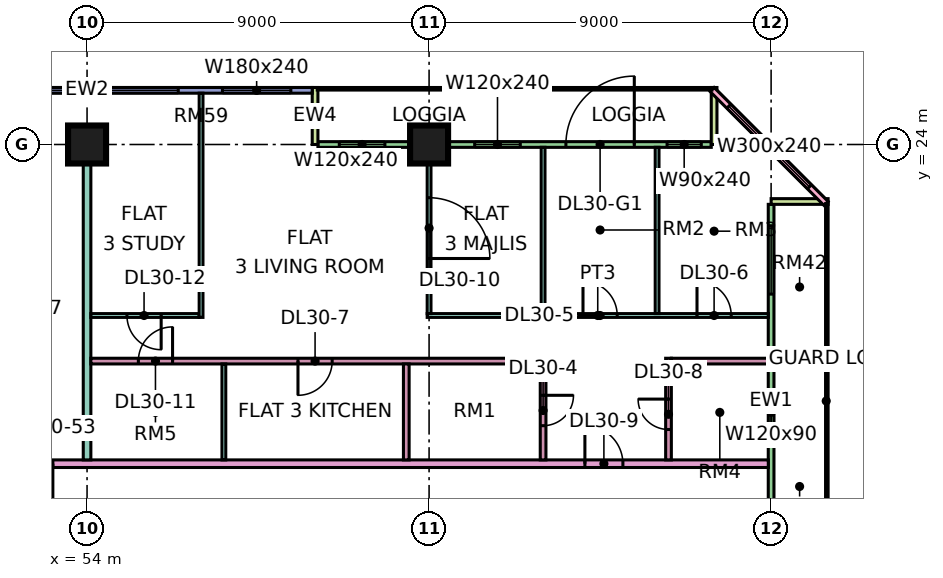
"""IFC4 building model, lengths in metres.
Left out: names, types, materials, properties, quantities, classifications, styles, units other than length and angle.
Written with IfcOpenShell. Run it as: python <this file> out.ifc"""

import sys

from ifc_helpers import new_model, si_unit, direction, frame, frame_2d, origin, origin_2d, place, context, subcontext, project, spatial, rectangle, extrude, element, fill, save


model = new_model("IFC4")
c1 = context("Model", 3, precision=1e-05, world=origin(), true_north=direction((0.0, 1.0)))
c2 = subcontext(c1, "Body", "Model", "MODEL_VIEW")
j1 = project(units=[si_unit("LENGTHUNIT", "METRE"), si_unit("PLANEANGLEUNIT", "RADIAN")], contexts=[c1])
p1 = place(None, origin())
s1 = spatial("IfcSite", under=j1, at=p1, CompositionType="ELEMENT")
p2 = place(p1, origin())
s2 = spatial("IfcBuilding", under=s1, at=p2, CompositionType="ELEMENT")
p3 = place(p2, frame((0.0, 0.0, 129.4)))
s3 = spatial("IfcBuildingStorey", under=s2, at=p3, CompositionType="ELEMENT", Elevation=129.4)
for number, where, z_axis, x_axis in (
    (1, (54.0, 24.0, 0.0), (0.0, 0.0, 1.0), (1.0, 0.0, 0.0)),
    (2, (63.0, 24.0, 0.0), (0.0, 0.0, 1.0), (1.0, 0.0, 0.0)),
):
    element("IfcColumn", number, at=place(p3, frame(where, z_axis=z_axis, x_axis=x_axis)), inside=s3, PredefinedType="COLUMN", context=c2, shape_type="SweptSolid", body=[
        extrude(rectangle(XDim=1.0, YDim=1.0, at=origin_2d()), origin(), (0.0, 0.0, 1.0), 3.75),
    ])
p4 = place(p3, frame((70.425, 24.0, 0.0), z_axis=(0.0, 0.0, 1.0), x_axis=(-1.0, 0.0, 0.0)))
e3 = element("IfcWall", 3, at=p4, inside=s3, PredefinedType="SOLIDWALL", context=c2, shape_type="SweptSolid", body=[
    extrude(rectangle(XDim=10.35, YDim=0.15, at=frame_2d((5.175, 0.0))), origin(), (0.0, 0.0, 1.0), 3.35),
])
p5 = place(p4, frame((0.262, 0.0, 0.45)))
e4 = element("IfcOpeningElement", 4, at=p5, cuts=e3, PredefinedType="OPENING", context=c2, shape_type="SweptSolid", body=[
    extrude(rectangle(XDim=0.9, YDim=2.4, at=frame_2d((0.45, 1.2))), frame((0.0, 0.085, 0.0), z_axis=(0.0, -1.0, 0.0), x_axis=(1.0, 0.0, 0.0)), (0.0, 0.0, 1.0), 0.17),
])
p6 = place(p4, frame((2.025, 0.0, 0.0)))
e5 = element("IfcOpeningElement", 5, at=p6, cuts=e3, PredefinedType="OPENING", context=c2, shape_type="SweptSolid", body=[
    extrude(rectangle(XDim=1.8, YDim=2.4, at=frame_2d((0.9, 1.2))), frame((0.0, 0.085, 0.0), z_axis=(0.0, -1.0, 0.0), x_axis=(1.0, 0.0, 0.0)), (0.0, 0.0, 1.0), 0.17),
])
p7 = place(p4, frame((5.025, 0.0, 0.45)))
e6 = element("IfcOpeningElement", 6, at=p7, cuts=e3, PredefinedType="OPENING", context=c2, shape_type="SweptSolid", body=[
    extrude(rectangle(XDim=1.2, YDim=2.4, at=frame_2d((0.6, 1.2))), frame((0.0, 0.085, 0.0), z_axis=(0.0, -1.0, 0.0), x_axis=(1.0, 0.0, 0.0)), (0.0, 0.0, 1.0), 0.17),
])
p8 = place(p4, frame((8.587, 0.0, 0.45)))
e7 = element("IfcOpeningElement", 7, at=p8, cuts=e3, PredefinedType="OPENING", context=c2, shape_type="SweptSolid", body=[
    extrude(rectangle(XDim=1.2, YDim=2.4, at=frame_2d((0.6, 1.2))), frame((0.0, 0.085, 0.0), z_axis=(0.0, -1.0, 0.0), x_axis=(1.0, 0.0, 0.0)), (0.0, 0.0, 1.0), 0.17),
])
for number, where, z_axis, x_axis in (
    (8, (70.5, 25.5, 0.0), (0.0, 0.0, 1.0), (0.0, -1.0, 0.0)),
    (9, (60.0, 25.5, 0.0), (0.0, 0.0, 1.0), (0.0, -1.0, 0.0)),
):
    element("IfcWall", number, at=place(p3, frame(where, z_axis=z_axis, x_axis=x_axis)), inside=s3, PredefinedType="SOLIDWALL", context=c2, shape_type="SweptSolid", body=[
        extrude(rectangle(XDim=1.5, YDim=0.15, at=frame_2d((0.75, 0.0))), origin(), (0.0, 0.0, 1.0), 3.35),
    ])
p9 = place(p3, frame((59.925, 25.425, 0.0), z_axis=(0.0, 0.0, 1.0), x_axis=(-1.0, 0.0, 0.0)))
e10 = element("IfcWall", 10, at=p9, inside=s3, PredefinedType="SOLIDWALL", context=c2, shape_type="SweptSolid", body=[
    extrude(rectangle(XDim=11.85, YDim=0.15, at=frame_2d((5.925, 0.0))), origin(), (0.0, 0.0, 1.0), 3.35),
])
p10 = place(p9, frame((0.562, 0.0, 0.45)))
e11 = element("IfcOpeningElement", 11, at=p10, cuts=e10, PredefinedType="OPENING", context=c2, shape_type="SweptSolid", body=[
    extrude(rectangle(XDim=1.8, YDim=2.4, at=frame_2d((0.9, 1.2))), frame((0.0, 0.085, 0.0), z_axis=(0.0, -1.0, 0.0), x_axis=(1.0, 0.0, 0.0)), (0.0, 0.0, 1.0), 0.17),
])
p11 = place(p9, frame((3.525, 0.0, 0.45)))
e12 = element("IfcOpeningElement", 12, at=p11, cuts=e10, PredefinedType="OPENING", context=c2, shape_type="SweptSolid", body=[
    extrude(rectangle(XDim=1.8, YDim=2.4, at=frame_2d((0.9, 1.2))), frame((0.0, 0.085, 0.0), z_axis=(0.0, -1.0, 0.0), x_axis=(1.0, 0.0, 0.0)), (0.0, 0.0, 1.0), 0.17),
])
p12 = place(p9, frame((6.488, 0.0, 0.45)))
e13 = element("IfcOpeningElement", 13, at=p12, cuts=e10, PredefinedType="OPENING", context=c2, shape_type="SweptSolid", body=[
    extrude(rectangle(XDim=4.8, YDim=2.4, at=frame_2d((2.4, 1.2))), frame((0.0, 0.085, 0.0), z_axis=(0.0, -1.0, 0.0), x_axis=(1.0, 0.0, 0.0)), (0.0, 0.0, 1.0), 0.17),
])
p13 = place(p3, frame((72.0, 12.075, 0.0), z_axis=(0.0, 0.0, 1.0), x_axis=(0.0, 1.0, 0.0)))
e14 = element("IfcWall", 14, at=p13, inside=s3, PredefinedType="SOLIDWALL", context=c2, shape_type="SweptSolid", body=[
    extrude(rectangle(XDim=10.35, YDim=0.15, at=frame_2d((5.175, 0.0))), origin(), (0.0, 0.0, 1.0), 3.35),
])
p14 = place(p13, frame((4.275, 0.0, 1.7)))
e15 = element("IfcOpeningElement", 15, at=p14, cuts=e14, PredefinedType="OPENING", context=c2, shape_type="SweptSolid", body=[
    extrude(rectangle(XDim=1.2, YDim=0.9, at=frame_2d((0.6, 0.45))), frame((0.0, 0.085, 0.0), z_axis=(0.0, -1.0, 0.0), x_axis=(1.0, 0.0, 0.0)), (0.0, 0.0, 1.0), 0.17),
])
p15 = place(p13, frame((7.988, 0.0, 0.45)))
e16 = element("IfcOpeningElement", 16, at=p15, cuts=e14, PredefinedType="OPENING", context=c2, shape_type="SweptSolid", body=[
    extrude(rectangle(XDim=1.8, YDim=2.4, at=frame_2d((0.9, 1.2))), frame((0.0, 0.085, 0.0), z_axis=(0.0, -1.0, 0.0), x_axis=(1.0, 0.0, 0.0)), (0.0, 0.0, 1.0), 0.17),
])
p16 = place(p3, frame((73.5, 22.5, 0.0), z_axis=(0.0, 0.0, 1.0), x_axis=(-1.0, 0.0, 0.0)))
e17 = element("IfcWall", 17, at=p16, inside=s3, PredefinedType="SOLIDWALL", context=c2, shape_type="SweptSolid", body=[
    extrude(rectangle(XDim=1.5, YDim=0.15, at=frame_2d((0.75, 0.0))), origin(), (0.0, 0.0, 1.0), 3.35),
])
p17 = place(p3, frame((73.447, 22.447, 0.0), z_axis=(0.0, 0.0, 1.0), x_axis=(-0.707106781187, 0.707106781187, 0.0)))
e18 = element("IfcWall", 18, at=p17, inside=s3, PredefinedType="SOLIDWALL", context=c2, shape_type="SweptSolid", body=[
    extrude(rectangle(XDim=4.243, YDim=0.15, at=frame_2d((2.121, 0.0))), origin(), (0.0, 0.0, 1.0), 3.35),
])
p18 = place(p17, frame((0.621, 0.0, 0.45)))
e19 = element("IfcOpeningElement", 19, at=p18, cuts=e18, PredefinedType="OPENING", context=c2, shape_type="SweptSolid", body=[
    extrude(rectangle(XDim=3.0, YDim=2.4, at=frame_2d((1.5, 1.2))), frame((0.0, 0.085, 0.0), z_axis=(0.0, -1.0, 0.0), x_axis=(1.0, 0.0, 0.0)), (0.0, 0.0, 1.0), 0.17),
])
p19 = place(p3, frame((51.225, 15.6, 0.0), z_axis=(0.0, 0.0, 1.0), x_axis=(1.0, 0.0, 0.0)))
e20 = element("IfcWall", 20, at=p19, inside=s3, PredefinedType="PARTITIONING", context=c2, shape_type="SweptSolid", body=[
    extrude(rectangle(XDim=20.701, YDim=0.2, at=frame_2d((10.351, 0.0))), origin(), (0.0, 0.0, 1.0), 3.35),
])
p20 = place(p19, frame((15.875, 0.0, 0.0)))
e21 = element("IfcOpeningElement", 21, at=p20, cuts=e20, PredefinedType="OPENING", context=c2, shape_type="SweptSolid", body=[
    extrude(rectangle(XDim=1.0, YDim=2.1, at=frame_2d((0.5, 1.05))), frame((0.0, 0.11, 0.0), z_axis=(0.0, -1.0, 0.0), x_axis=(1.0, 0.0, 0.0)), (0.0, 0.0, 1.0), 0.22),
])
p21 = place(p19, frame((0.875, 0.0, 0.0)))
e22 = element("IfcOpeningElement", 22, at=p21, cuts=e20, PredefinedType="OPENING", context=c2, shape_type="SweptSolid", body=[
    extrude(rectangle(XDim=1.0, YDim=2.1, at=frame_2d((0.5, 1.05))), frame((0.0, 0.11, 0.0), z_axis=(0.0, -1.0, 0.0), x_axis=(1.0, 0.0, 0.0)), (0.0, 0.0, 1.0), 0.22),
])
p22 = place(p3, frame((54.0, 15.7, 0.0), z_axis=(0.0, 0.0, 1.0), x_axis=(0.0, 1.0, 0.0)))
e23 = element("IfcWall", 23, at=p22, inside=s3, PredefinedType="PARTITIONING", context=c2, shape_type="SweptSolid", body=[
    extrude(rectangle(XDim=8.3, YDim=0.2, at=frame_2d((4.15, 0.0))), origin(), (0.0, 0.0, 1.0), 3.35),
])
p23 = place(p3, frame((54.1, 18.3, 0.0), z_axis=(0.0, 0.0, 1.0), x_axis=(1.0, 0.0, 0.0)))
e24 = element("IfcWall", 24, at=p23, inside=s3, PredefinedType="PARTITIONING", context=c2, shape_type="SweptSolid", body=[
    extrude(rectangle(XDim=11.975, YDim=0.15, at=frame_2d((5.987, 0.0))), origin(), (0.0, 0.0, 1.0), 3.35),
])
p24 = place(p23, frame((5.45, 0.0, 0.0)))
e25 = element("IfcOpeningElement", 25, at=p24, cuts=e24, PredefinedType="OPENING", context=c2, shape_type="SweptSolid", body=[
    extrude(rectangle(XDim=0.9, YDim=2.1, at=frame_2d((0.45, 1.05))), frame((0.0, 0.085, 0.0), z_axis=(0.0, -1.0, 0.0), x_axis=(1.0, 0.0, 0.0)), (0.0, 0.0, 1.0), 0.17),
])
p25 = place(p23, frame((1.25, 0.0, 0.0)))
e26 = element("IfcOpeningElement", 26, at=p25, cuts=e24, PredefinedType="OPENING", context=c2, shape_type="SweptSolid", body=[
    extrude(rectangle(XDim=0.9, YDim=2.1, at=frame_2d((0.45, 1.05))), frame((0.0, 0.085, 0.0), z_axis=(0.0, -1.0, 0.0), x_axis=(1.0, 0.0, 0.0)), (0.0, 0.0, 1.0), 0.17),
])
p26 = place(p3, frame((54.1, 19.5, 0.0), z_axis=(0.0, 0.0, 1.0), x_axis=(1.0, 0.0, 0.0)))
e27 = element("IfcWall", 27, at=p26, inside=s3, PredefinedType="PARTITIONING", context=c2, shape_type="SweptSolid", body=[
    extrude(rectangle(XDim=2.85, YDim=0.1, at=frame_2d((1.425, 0.0))), origin(), (0.0, 0.0, 1.0), 3.35),
])
p27 = place(p26, frame((0.95, 0.0, 0.0)))
e28 = element("IfcOpeningElement", 28, at=p27, cuts=e27, PredefinedType="OPENING", context=c2, shape_type="SweptSolid", body=[
    extrude(rectangle(XDim=0.9, YDim=2.1, at=frame_2d((0.45, 1.05))), frame((0.0, 0.06, 0.0), z_axis=(0.0, -1.0, 0.0), x_axis=(1.0, 0.0, 0.0)), (0.0, 0.0, 1.0), 0.12),
])
p28 = place(p3, frame((57.0, 19.45, 0.0), z_axis=(0.0, 0.0, 1.0), x_axis=(0.0, 1.0, 0.0)))
e29 = element("IfcWall", 29, at=p28, inside=s3, PredefinedType="PARTITIONING", context=c2, shape_type="SweptSolid", body=[
    extrude(rectangle(XDim=5.9, YDim=0.1, at=frame_2d((2.95, 0.0))), origin(), (0.0, 0.0, 1.0), 3.35),
])
p29 = place(p3, frame((57.6, 15.7, 0.0), z_axis=(0.0, 0.0, 1.0), x_axis=(0.0, 1.0, 0.0)))
e30 = element("IfcWall", 30, at=p29, inside=s3, PredefinedType="PARTITIONING", context=c2, shape_type="SweptSolid", body=[
    extrude(rectangle(XDim=2.525, YDim=0.1, at=frame_2d((1.263, 0.0))), origin(), (0.0, 0.0, 1.0), 3.35),
])
p30 = place(p3, frame((62.4, 15.7, 0.0), z_axis=(0.0, 0.0, 1.0), x_axis=(0.0, 1.0, 0.0)))
e31 = element("IfcWall", 31, at=p30, inside=s3, PredefinedType="PARTITIONING", context=c2, shape_type="SweptSolid", body=[
    extrude(rectangle(XDim=2.525, YDim=0.15, at=frame_2d((1.263, 0.0))), origin(), (0.0, 0.0, 1.0), 3.35),
])
p31 = place(p3, frame((62.95, 19.5, 0.0), z_axis=(0.0, 0.0, 1.0), x_axis=(1.0, 0.0, 0.0)))
e32 = element("IfcWall", 32, at=p31, inside=s3, PredefinedType="PARTITIONING", context=c2, shape_type="SweptSolid", body=[
    extrude(rectangle(XDim=8.976, YDim=0.1, at=frame_2d((4.488, 0.0))), origin(), (0.0, 0.0, 1.0), 3.35),
])
p32 = place(p31, frame((4.1, 0.0, 0.0)))
e33 = element("IfcOpeningElement", 33, at=p32, cuts=e32, PredefinedType="OPENING", context=c2, shape_type="SweptSolid", body=[
    extrude(rectangle(XDim=0.9, YDim=2.1, at=frame_2d((0.45, 1.05))), frame((0.0, 0.06, 0.0), z_axis=(0.0, -1.0, 0.0), x_axis=(1.0, 0.0, 0.0)), (0.0, 0.0, 1.0), 0.12),
])
p33 = place(p31, frame((7.1, 0.0, 0.0)))
e34 = element("IfcOpeningElement", 34, at=p33, cuts=e32, PredefinedType="OPENING", context=c2, shape_type="SweptSolid", body=[
    extrude(rectangle(XDim=0.9, YDim=2.1, at=frame_2d((0.45, 1.05))), frame((0.0, 0.06, 0.0), z_axis=(0.0, -1.0, 0.0), x_axis=(1.0, 0.0, 0.0)), (0.0, 0.0, 1.0), 0.12),
])
p34 = place(p3, frame((63.0, 19.55, 0.0), z_axis=(0.0, 0.0, 1.0), x_axis=(0.0, 1.0, 0.0)))
e35 = element("IfcWall", 35, at=p34, inside=s3, PredefinedType="PARTITIONING", context=c2, shape_type="SweptSolid", body=[
    extrude(rectangle(XDim=4.376, YDim=0.1, at=frame_2d((2.188, 0.0))), origin(), (0.0, 0.0, 1.0), 3.35),
])
p35 = place(p34, frame((1.45, 0.0, 0.0)))
e36 = element("IfcOpeningElement", 36, at=p35, cuts=e35, PredefinedType="OPENING", context=c2, shape_type="SweptSolid", body=[
    extrude(rectangle(XDim=1.6, YDim=2.1, at=frame_2d((0.8, 1.05))), frame((0.0, 0.06, 0.0), z_axis=(0.0, -1.0, 0.0), x_axis=(1.0, 0.0, 0.0)), (0.0, 0.0, 1.0), 0.12),
])
p36 = place(p3, frame((66.0, 15.7, 0.0), z_axis=(0.0, 0.0, 1.0), x_axis=(0.0, 1.0, 0.0)))
e37 = element("IfcWall", 37, at=p36, inside=s3, PredefinedType="PARTITIONING", context=c2, shape_type="SweptSolid", body=[
    extrude(rectangle(XDim=2.525, YDim=0.15, at=frame_2d((1.263, 0.0))), origin(), (0.0, 0.0, 1.0), 3.35),
])
p37 = place(p36, frame((0.9, 0.0, 0.0)))
e38 = element("IfcOpeningElement", 38, at=p37, cuts=e37, PredefinedType="OPENING", context=c2, shape_type="SweptSolid", body=[
    extrude(rectangle(XDim=0.8, YDim=2.1, at=frame_2d((0.4, 1.05))), frame((0.0, 0.085, 0.0), z_axis=(0.0, -1.0, 0.0), x_axis=(1.0, 0.0, 0.0)), (0.0, 0.0, 1.0), 0.17),
])
for number, where, z_axis, x_axis in (
    (39, (66.0, 19.55, 0.0), (0.0, 0.0, 1.0), (0.0, 1.0, 0.0)),
    (40, (69.0, 19.55, 0.0), (0.0, 0.0, 1.0), (0.0, 1.0, 0.0)),
):
    element("IfcWall", number, at=place(p3, frame(where, z_axis=z_axis, x_axis=x_axis)), inside=s3, PredefinedType="PARTITIONING", context=c2, shape_type="SweptSolid", body=[
        extrude(rectangle(XDim=4.376, YDim=0.1, at=frame_2d((2.188, 0.0))), origin(), (0.0, 0.0, 1.0), 3.35),
    ])
p38 = place(p3, frame((69.3, 15.7, 0.0), z_axis=(0.0, 0.0, 1.0), x_axis=(0.0, 1.0, 0.0)))
e41 = element("IfcWall", 41, at=p38, inside=s3, PredefinedType="PARTITIONING", context=c2, shape_type="SweptSolid", body=[
    extrude(rectangle(XDim=2.675, YDim=0.15, at=frame_2d((1.337, 0.0))), origin(), (0.0, 0.0, 1.0), 3.35),
])
p39 = place(p38, frame((0.8, 0.0, 0.0)))
e42 = element("IfcOpeningElement", 42, at=p39, cuts=e41, PredefinedType="OPENING", context=c2, shape_type="SweptSolid", body=[
    extrude(rectangle(XDim=0.8, YDim=2.1, at=frame_2d((0.4, 1.05))), frame((0.0, 0.085, 0.0), z_axis=(0.0, -1.0, 0.0), x_axis=(1.0, 0.0, 0.0)), (0.0, 0.0, 1.0), 0.17),
])
p40 = place(p3, frame((69.375, 18.3, 0.0), z_axis=(0.0, 0.0, 1.0), x_axis=(1.0, 0.0, 0.0)))
e43 = element("IfcWall", 43, at=p40, inside=s3, PredefinedType="PARTITIONING", context=c2, shape_type="SweptSolid", body=[
    extrude(rectangle(XDim=2.551, YDim=0.15, at=frame_2d((1.275, 0.0))), origin(), (0.0, 0.0, 1.0), 3.35),
])
p41 = place(p5, origin())
e44 = element("IfcWindow", 44, at=p41, inside=s3, PartitioningType="SINGLE_PANEL", PredefinedType="WINDOW", context=c2, shape_type="SweptSolid", body=[
    extrude(rectangle(XDim=0.9, YDim=2.4, at=frame_2d((0.45, 1.2))), frame((0.0, 0.03, 0.0), z_axis=(0.0, -1.0, 0.0), x_axis=(1.0, 0.0, 0.0)), (0.0, 0.0, 1.0), 0.06),
])
fill(e4, e44)
p42 = place(p6, frame((1.8, 0.0, 0.0), z_axis=(0.0, 0.0, 1.0), x_axis=(-1.0, 0.0, 0.0)))
e45 = element("IfcDoor", 45, at=p42, inside=s3, OperationType="DOUBLE_DOOR_SINGLE_SWING", PredefinedType="DOOR", context=c2, shape_type="SweptSolid", body=[
    extrude(rectangle(XDim=1.8, YDim=2.4, at=frame_2d((0.9, 1.2))), frame((0.0, 0.025, 0.0), z_axis=(0.0, -1.0, 0.0), x_axis=(1.0, 0.0, 0.0)), (0.0, 0.0, 1.0), 0.05),
])
fill(e5, e45)
p43 = place(p7, origin())
e46 = element("IfcWindow", 46, at=p43, inside=s3, PartitioningType="SINGLE_PANEL", PredefinedType="WINDOW", context=c2, shape_type="SweptSolid", body=[
    extrude(rectangle(XDim=1.2, YDim=2.4, at=frame_2d((0.6, 1.2))), frame((0.0, 0.03, 0.0), z_axis=(0.0, -1.0, 0.0), x_axis=(1.0, 0.0, 0.0)), (0.0, 0.0, 1.0), 0.06),
])
fill(e6, e46)
p44 = place(p8, origin())
e47 = element("IfcWindow", 47, at=p44, inside=s3, PartitioningType="SINGLE_PANEL", PredefinedType="WINDOW", context=c2, shape_type="SweptSolid", body=[
    extrude(rectangle(XDim=1.2, YDim=2.4, at=frame_2d((0.6, 1.2))), frame((0.0, 0.03, 0.0), z_axis=(0.0, -1.0, 0.0), x_axis=(1.0, 0.0, 0.0)), (0.0, 0.0, 1.0), 0.06),
])
fill(e7, e47)
p45 = place(p10, origin())
e48 = element("IfcWindow", 48, at=p45, inside=s3, PartitioningType="SINGLE_PANEL", PredefinedType="WINDOW", context=c2, shape_type="SweptSolid", body=[
    extrude(rectangle(XDim=1.8, YDim=2.4, at=frame_2d((0.9, 1.2))), frame((0.0, 0.03, 0.0), z_axis=(0.0, -1.0, 0.0), x_axis=(1.0, 0.0, 0.0)), (0.0, 0.0, 1.0), 0.06),
])
fill(e11, e48)
p46 = place(p11, origin())
e49 = element("IfcWindow", 49, at=p46, inside=s3, PartitioningType="SINGLE_PANEL", PredefinedType="WINDOW", context=c2, shape_type="SweptSolid", body=[
    extrude(rectangle(XDim=1.8, YDim=2.4, at=frame_2d((0.9, 1.2))), frame((0.0, 0.03, 0.0), z_axis=(0.0, -1.0, 0.0), x_axis=(1.0, 0.0, 0.0)), (0.0, 0.0, 1.0), 0.06),
])
fill(e12, e49)
p47 = place(p12, origin())
e50 = element("IfcWindow", 50, at=p47, inside=s3, PartitioningType="SINGLE_PANEL", PredefinedType="WINDOW", context=c2, shape_type="SweptSolid", body=[
    extrude(rectangle(XDim=4.8, YDim=2.4, at=frame_2d((2.4, 1.2))), frame((0.0, 0.03, 0.0), z_axis=(0.0, -1.0, 0.0), x_axis=(1.0, 0.0, 0.0)), (0.0, 0.0, 1.0), 0.06),
])
fill(e13, e50)
p48 = place(p14, origin())
e51 = element("IfcWindow", 51, at=p48, inside=s3, PartitioningType="SINGLE_PANEL", PredefinedType="WINDOW", context=c2, shape_type="SweptSolid", body=[
    extrude(rectangle(XDim=1.2, YDim=0.9, at=frame_2d((0.6, 0.45))), frame((0.0, 0.03, 0.0), z_axis=(0.0, -1.0, 0.0), x_axis=(1.0, 0.0, 0.0)), (0.0, 0.0, 1.0), 0.06),
])
fill(e15, e51)
p49 = place(p15, origin())
e52 = element("IfcWindow", 52, at=p49, inside=s3, PartitioningType="SINGLE_PANEL", PredefinedType="WINDOW", context=c2, shape_type="SweptSolid", body=[
    extrude(rectangle(XDim=1.8, YDim=2.4, at=frame_2d((0.9, 1.2))), frame((0.0, 0.03, 0.0), z_axis=(0.0, -1.0, 0.0), x_axis=(1.0, 0.0, 0.0)), (0.0, 0.0, 1.0), 0.06),
])
fill(e16, e52)
p50 = place(p18, origin())
e53 = element("IfcWindow", 53, at=p50, inside=s3, PartitioningType="SINGLE_PANEL", PredefinedType="WINDOW", context=c2, shape_type="SweptSolid", body=[
    extrude(rectangle(XDim=3.0, YDim=2.4, at=frame_2d((1.5, 1.2))), frame((0.0, 0.03, 0.0), z_axis=(0.0, -1.0, 0.0), x_axis=(1.0, 0.0, 0.0)), (0.0, 0.0, 1.0), 0.06),
])
fill(e19, e53)
p51 = place(p37, origin())
e54 = element("IfcDoor", 54, at=p51, inside=s3, OperationType="SINGLE_SWING_RIGHT", PredefinedType="DOOR", context=c2, shape_type="SweptSolid", body=[
    extrude(rectangle(XDim=0.8, YDim=2.1, at=frame_2d((0.4, 1.05))), frame((0.0, 0.025, 0.0), z_axis=(0.0, -1.0, 0.0), x_axis=(1.0, 0.0, 0.0)), (0.0, 0.0, 1.0), 0.05),
])
fill(e38, e54)
p52 = place(p32, origin())
e55 = element("IfcDoor", 55, at=p52, inside=s3, OperationType="SINGLE_SWING_LEFT", PredefinedType="DOOR", context=c2, shape_type="SweptSolid", body=[
    extrude(rectangle(XDim=0.9, YDim=2.1, at=frame_2d((0.45, 1.05))), frame((0.0, 0.025, 0.0), z_axis=(0.0, -1.0, 0.0), x_axis=(1.0, 0.0, 0.0)), (0.0, 0.0, 1.0), 0.05),
])
fill(e33, e55)
p53 = place(p33, origin())
e56 = element("IfcDoor", 56, at=p53, inside=s3, OperationType="SINGLE_SWING_LEFT", PredefinedType="DOOR", context=c2, shape_type="SweptSolid", body=[
    extrude(rectangle(XDim=0.9, YDim=2.1, at=frame_2d((0.45, 1.05))), frame((0.0, 0.025, 0.0), z_axis=(0.0, -1.0, 0.0), x_axis=(1.0, 0.0, 0.0)), (0.0, 0.0, 1.0), 0.05),
])
fill(e34, e56)
p54 = place(p24, frame((0.9, 0.0, 0.0), z_axis=(0.0, 0.0, 1.0), x_axis=(-1.0, 0.0, 0.0)))
e57 = element("IfcDoor", 57, at=p54, inside=s3, OperationType="SINGLE_SWING_LEFT", PredefinedType="DOOR", context=c2, shape_type="SweptSolid", body=[
    extrude(rectangle(XDim=0.9, YDim=2.1, at=frame_2d((0.45, 1.05))), frame((0.0, 0.025, 0.0), z_axis=(0.0, -1.0, 0.0), x_axis=(1.0, 0.0, 0.0)), (0.0, 0.0, 1.0), 0.05),
])
fill(e25, e57)
p55 = place(p39, frame((0.8, 0.0, 0.0), z_axis=(0.0, 0.0, 1.0), x_axis=(-1.0, 0.0, 0.0)))
e58 = element("IfcDoor", 58, at=p55, inside=s3, OperationType="SINGLE_SWING_RIGHT", PredefinedType="DOOR", context=c2, shape_type="SweptSolid", body=[
    extrude(rectangle(XDim=0.8, YDim=2.1, at=frame_2d((0.4, 1.05))), frame((0.0, 0.025, 0.0), z_axis=(0.0, -1.0, 0.0), x_axis=(1.0, 0.0, 0.0)), (0.0, 0.0, 1.0), 0.05),
])
fill(e42, e58)
p56 = place(p20, origin())
e59 = element("IfcDoor", 59, at=p56, inside=s3, OperationType="SINGLE_SWING_LEFT", PredefinedType="DOOR", context=c2, shape_type="SweptSolid", body=[
    extrude(rectangle(XDim=1.0, YDim=2.1, at=frame_2d((0.5, 1.05))), frame((0.0, 0.025, 0.0), z_axis=(0.0, -1.0, 0.0), x_axis=(1.0, 0.0, 0.0)), (0.0, 0.0, 1.0), 0.05),
])
fill(e21, e59)
p57 = place(p35, frame((1.6, 0.0, 0.0), z_axis=(0.0, 0.0, 1.0), x_axis=(-1.0, 0.0, 0.0)))
e60 = element("IfcDoor", 60, at=p57, inside=s3, OperationType="DOUBLE_DOOR_SINGLE_SWING", PredefinedType="DOOR", context=c2, shape_type="SweptSolid", body=[
    extrude(rectangle(XDim=1.6, YDim=2.1, at=frame_2d((0.8, 1.05))), frame((0.0, 0.025, 0.0), z_axis=(0.0, -1.0, 0.0), x_axis=(1.0, 0.0, 0.0)), (0.0, 0.0, 1.0), 0.05),
])
fill(e36, e60)
p58 = place(p25, frame((0.9, 0.0, 0.0), z_axis=(0.0, 0.0, 1.0), x_axis=(-1.0, 0.0, 0.0)))
e61 = element("IfcDoor", 61, at=p58, inside=s3, OperationType="SINGLE_SWING_RIGHT", PredefinedType="DOOR", context=c2, shape_type="SweptSolid", body=[
    extrude(rectangle(XDim=0.9, YDim=2.1, at=frame_2d((0.45, 1.05))), frame((0.0, 0.025, 0.0), z_axis=(0.0, -1.0, 0.0), x_axis=(1.0, 0.0, 0.0)), (0.0, 0.0, 1.0), 0.05),
])
fill(e26, e61)
p59 = place(p27, origin())
e62 = element("IfcDoor", 62, at=p59, inside=s3, OperationType="SINGLE_SWING_RIGHT", PredefinedType="DOOR", context=c2, shape_type="SweptSolid", body=[
    extrude(rectangle(XDim=0.9, YDim=2.1, at=frame_2d((0.45, 1.05))), frame((0.0, 0.025, 0.0), z_axis=(0.0, -1.0, 0.0), x_axis=(1.0, 0.0, 0.0)), (0.0, 0.0, 1.0), 0.05),
])
fill(e28, e62)
p60 = place(p21, origin())
e63 = element("IfcDoor", 63, at=p60, inside=s3, OperationType="SINGLE_SWING_RIGHT", PredefinedType="DOOR", context=c2, shape_type="SweptSolid", body=[
    extrude(rectangle(XDim=1.0, YDim=2.1, at=frame_2d((0.5, 1.05))), frame((0.0, 0.025, 0.0), z_axis=(0.0, -1.0, 0.0), x_axis=(1.0, 0.0, 0.0)), (0.0, 0.0, 1.0), 0.05),
])
fill(e22, e63)
save(model, sys.argv[1])
